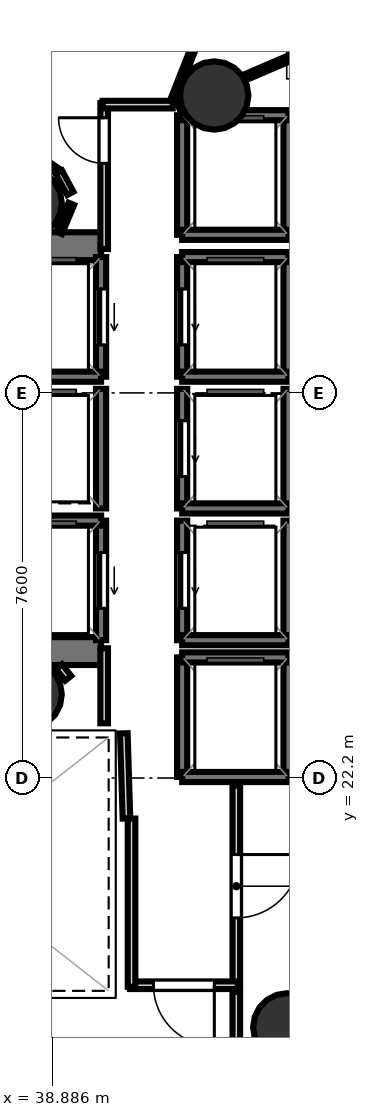
"""IFC4 building model, lengths in metres.
Left out: names, types, materials, properties, quantities, classifications, styles, units other than length and angle.
Written with IfcOpenShell. Run it as: python <this file> out.ifc"""

import sys

from ifc_helpers import new_model, si_unit, direction, frame, frame_2d, origin, origin_2d, place, context, subcontext, project, spatial, rectangle, hollow_circle, extrude, element, fill, save


model = new_model("IFC4")
c1 = context("Model", 3, precision=1e-05, world=origin(), true_north=direction((0.0, 1.0)))
c2 = subcontext(c1, "Body", "Model", "MODEL_VIEW")
j1 = project(units=[si_unit("LENGTHUNIT", "METRE"), si_unit("PLANEANGLEUNIT", "RADIAN")], contexts=[c1])
p1 = place(None, origin())
s1 = spatial("IfcSite", under=j1, at=p1, CompositionType="ELEMENT")
p2 = place(p1, origin())
s2 = spatial("IfcBuilding", under=s1, at=p2, CompositionType="ELEMENT")
p3 = place(p2, frame((0.0, 0.0, 169.8)))
s3 = spatial("IfcBuildingStorey", under=s2, at=p3, CompositionType="ELEMENT", Elevation=169.8)
p4 = place(p3, frame((29.23, 32.695, 0.0), z_axis=(0.0, 0.0, 1.0), x_axis=(1.0, 0.0, 0.0)))
e1 = element("IfcWall", 1, at=p4, inside=s3, PredefinedType="SHEAR", context=c2, shape_type="SweptSolid", body=[
    extrude(rectangle(XDim=10.62, YDim=0.55, at=frame_2d((5.31, 0.0))), origin(), (0.0, 0.0, 1.0), 3.52),
])
p5 = place(p4, frame((0.995, 0.0, 0.0)))
e2 = element("IfcOpeningElement", 2, at=p5, cuts=e1, PredefinedType="OPENING", context=c2, shape_type="SweptSolid", body=[
    extrude(rectangle(XDim=1.25, YDim=2.15, at=frame_2d((0.625, 1.075))), frame((0.0, 0.285, 0.0), z_axis=(0.0, -1.0, 0.0), x_axis=(1.0, 0.0, 0.0)), (0.0, 0.0, 1.0), 0.57),
])
p6 = place(p3, frame((29.23, 24.705, 0.0), z_axis=(0.0, 0.0, 1.0), x_axis=(1.0, 0.0, 0.0)))
e3 = element("IfcWall", 3, at=p6, inside=s3, PredefinedType="SHEAR", context=c2, shape_type="SweptSolid", body=[
    extrude(rectangle(XDim=10.62, YDim=0.55, at=frame_2d((5.31, 0.0))), origin(), (0.0, 0.0, 1.0), 3.52),
])
p7 = place(p6, frame((0.795, 0.0, 0.0)))
e4 = element("IfcOpeningElement", 4, at=p7, cuts=e3, PredefinedType="OPENING", context=c2, shape_type="SweptSolid", body=[
    extrude(rectangle(XDim=1.25, YDim=2.15, at=frame_2d((0.625, 1.075))), frame((0.0, 0.285, 0.0), z_axis=(0.0, -1.0, 0.0), x_axis=(1.0, 0.0, 0.0)), (0.0, 0.0, 1.0), 0.57),
])
for number, where, z_axis, x_axis in (
    (5, (38.4, 33.55, 0.0), (0.0, 0.0, 1.0), (1.0, 0.0, 0.0)),
    (6, (38.4, 23.85, 0.0), (0.0, 0.0, 1.0), (1.0, 0.0, 0.0)),
    (7, (42.083, 35.669, 0.0), (0.0, 0.0, 1.0), (1.0, 0.0, 0.0)),
    (8, (43.525, 17.279, 0.0), (0.0, 0.0, 1.0), (1.0, 0.0, 0.0)),
):
    element("IfcColumn", number, at=place(p3, frame(where, z_axis=z_axis, x_axis=x_axis)), inside=s3, PredefinedType="COLUMN", context=c2, shape_type="SweptSolid", body=[
        extrude(hollow_circle(Radius=0.675, WallThickness=0.032, at=origin_2d()), origin(), (0.0, 0.0, 1.0), 3.7),
    ])
p8 = place(p3, frame((39.85, 30.12, 0.0), z_axis=(0.0, 0.0, 1.0), x_axis=(0.0, 1.0, 0.0)))
e9 = element("IfcWall", 9, at=p8, inside=s3, PredefinedType="SOLIDWALL", context=c2, shape_type="SweptSolid", body=[
    extrude(rectangle(XDim=2.36, YDim=0.2, at=frame_2d((1.18, 0.0))), origin(), (0.0, 0.0, 1.0), 3.52),
])
p9 = place(p8, frame((0.63, 0.0, 0.0)))
e10 = element("IfcOpeningElement", 10, at=p9, cuts=e9, PredefinedType="OPENING", context=c2, shape_type="SweptSolid", body=[
    extrude(rectangle(XDim=1.1, YDim=2.15, at=frame_2d((0.55, 1.075))), frame((0.0, 0.11, 0.0), z_axis=(0.0, -1.0, 0.0), x_axis=(1.0, 0.0, 0.0)), (0.0, 0.0, 1.0), 0.22),
])
p10 = place(p3, frame((37.75, 30.12, 0.0), z_axis=(0.0, 0.0, 1.0), x_axis=(1.0, 0.0, 0.0)))
e11 = element("IfcWall", 11, at=p10, inside=s3, PredefinedType="SOLIDWALL", context=c2, shape_type="SweptSolid", body=[
    extrude(rectangle(XDim=2.1, YDim=0.2, at=frame_2d((1.05, 0.0))), origin(), (0.0, 0.0, 1.0), 3.52),
])
p11 = place(p3, frame((39.85, 24.92, 0.0), z_axis=(0.0, 0.0, 1.0), x_axis=(0.0, 1.0, 0.0)))
e12 = element("IfcWall", 12, at=p11, inside=s3, PredefinedType="SOLIDWALL", context=c2, shape_type="SweptSolid", body=[
    extrude(rectangle(XDim=2.36, YDim=0.2, at=frame_2d((1.18, 0.0))), origin(), (0.0, 0.0, 1.0), 3.52),
])
p12 = place(p11, frame((0.63, 0.0, 0.0)))
e13 = element("IfcOpeningElement", 13, at=p12, cuts=e12, PredefinedType="OPENING", context=c2, shape_type="SweptSolid", body=[
    extrude(rectangle(XDim=1.1, YDim=2.15, at=frame_2d((0.55, 1.075))), frame((0.0, 0.11, 0.0), z_axis=(0.0, -1.0, 0.0), x_axis=(1.0, 0.0, 0.0)), (0.0, 0.0, 1.0), 0.22),
])
p13 = place(p3, frame((37.75, 27.28, 0.0), z_axis=(0.0, 0.0, 1.0), x_axis=(1.0, 0.0, 0.0)))
e14 = element("IfcWall", 14, at=p13, inside=s3, PredefinedType="SOLIDWALL", context=c2, shape_type="SweptSolid", body=[
    extrude(rectangle(XDim=2.1, YDim=0.2, at=frame_2d((1.05, 0.0))), origin(), (0.0, 0.0, 1.0), 3.52),
])
p14 = place(p3, frame((43.55, 30.12, 0.0), z_axis=(0.0, 0.0, 1.0), x_axis=(0.0, 1.0, 0.0)))
e15 = element("IfcWall", 15, at=p14, inside=s3, PredefinedType="SOLIDWALL", context=c2, shape_type="SweptSolid", body=[
    extrude(rectangle(XDim=2.36, YDim=0.2, at=frame_2d((1.18, 0.0))), origin(), (0.0, 0.0, 1.0), 3.52),
])
p15 = place(p3, frame((41.45, 30.12, 0.0), z_axis=(0.0, 0.0, 1.0), x_axis=(0.0, 1.0, 0.0)))
e16 = element("IfcWall", 16, at=p15, inside=s3, PredefinedType="SOLIDWALL", context=c2, shape_type="SweptSolid", body=[
    extrude(rectangle(XDim=2.36, YDim=0.2, at=frame_2d((1.18, 0.0))), origin(), (0.0, 0.0, 1.0), 3.52),
])
p16 = place(p15, frame((0.63, 0.0, 0.0)))
e17 = element("IfcOpeningElement", 17, at=p16, cuts=e16, PredefinedType="OPENING", context=c2, shape_type="SweptSolid", body=[
    extrude(rectangle(XDim=1.1, YDim=2.15, at=frame_2d((0.55, 1.075))), frame((0.0, 0.11, 0.0), z_axis=(0.0, -1.0, 0.0), x_axis=(1.0, 0.0, 0.0)), (0.0, 0.0, 1.0), 0.22),
])
for number, where, z_axis, x_axis in (
    (18, (41.45, 32.48, 0.0), (0.0, 0.0, 1.0), (1.0, 0.0, 0.0)),
    (19, (41.45, 30.12, 0.0), (0.0, 0.0, 1.0), (1.0, 0.0, 0.0)),
):
    element("IfcWall", number, at=place(p3, frame(where, z_axis=z_axis, x_axis=x_axis)), inside=s3, PredefinedType="SOLIDWALL", context=c2, shape_type="SweptSolid", body=[
        extrude(rectangle(XDim=2.1, YDim=0.2, at=frame_2d((1.05, 0.0))), origin(), (0.0, 0.0, 1.0), 3.52),
    ])
p17 = place(p3, frame((43.55, 27.52, 0.0), z_axis=(0.0, 0.0, 1.0), x_axis=(0.0, 1.0, 0.0)))
e20 = element("IfcWall", 20, at=p17, inside=s3, PredefinedType="SOLIDWALL", context=c2, shape_type="SweptSolid", body=[
    extrude(rectangle(XDim=2.36, YDim=0.2, at=frame_2d((1.18, 0.0))), origin(), (0.0, 0.0, 1.0), 3.52),
])
p18 = place(p3, frame((41.45, 27.52, 0.0), z_axis=(0.0, 0.0, 1.0), x_axis=(0.0, 1.0, 0.0)))
e21 = element("IfcWall", 21, at=p18, inside=s3, PredefinedType="SOLIDWALL", context=c2, shape_type="SweptSolid", body=[
    extrude(rectangle(XDim=2.36, YDim=0.2, at=frame_2d((1.18, 0.0))), origin(), (0.0, 0.0, 1.0), 3.52),
])
p19 = place(p18, frame((0.63, 0.0, 0.0)))
e22 = element("IfcOpeningElement", 22, at=p19, cuts=e21, PredefinedType="OPENING", context=c2, shape_type="SweptSolid", body=[
    extrude(rectangle(XDim=1.1, YDim=2.15, at=frame_2d((0.55, 1.075))), frame((0.0, 0.11, 0.0), z_axis=(0.0, -1.0, 0.0), x_axis=(1.0, 0.0, 0.0)), (0.0, 0.0, 1.0), 0.22),
])
p20 = place(p3, frame((41.45, 27.52, 0.0), z_axis=(0.0, 0.0, 1.0), x_axis=(1.0, 0.0, 0.0)))
e23 = element("IfcWall", 23, at=p20, inside=s3, PredefinedType="SOLIDWALL", context=c2, shape_type="SweptSolid", body=[
    extrude(rectangle(XDim=2.1, YDim=0.2, at=frame_2d((1.05, 0.0))), origin(), (0.0, 0.0, 1.0), 3.52),
])
p21 = place(p3, frame((43.55, 24.92, 0.0), z_axis=(0.0, 0.0, 1.0), x_axis=(0.0, 1.0, 0.0)))
e24 = element("IfcWall", 24, at=p21, inside=s3, PredefinedType="SOLIDWALL", context=c2, shape_type="SweptSolid", body=[
    extrude(rectangle(XDim=2.36, YDim=0.2, at=frame_2d((1.18, 0.0))), origin(), (0.0, 0.0, 1.0), 3.52),
])
p22 = place(p3, frame((41.45, 24.92, 0.0), z_axis=(0.0, 0.0, 1.0), x_axis=(0.0, 1.0, 0.0)))
e25 = element("IfcWall", 25, at=p22, inside=s3, PredefinedType="SOLIDWALL", context=c2, shape_type="SweptSolid", body=[
    extrude(rectangle(XDim=2.36, YDim=0.2, at=frame_2d((1.18, 0.0))), origin(), (0.0, 0.0, 1.0), 3.52),
])
p23 = place(p22, frame((0.63, 0.0, 0.0)))
e26 = element("IfcOpeningElement", 26, at=p23, cuts=e25, PredefinedType="OPENING", context=c2, shape_type="SweptSolid", body=[
    extrude(rectangle(XDim=1.1, YDim=2.15, at=frame_2d((0.55, 1.075))), frame((0.0, 0.11, 0.0), z_axis=(0.0, -1.0, 0.0), x_axis=(1.0, 0.0, 0.0)), (0.0, 0.0, 1.0), 0.22),
])
p24 = place(p3, frame((41.45, 24.92, 0.0), z_axis=(0.0, 0.0, 1.0), x_axis=(1.0, 0.0, 0.0)))
e27 = element("IfcWall", 27, at=p24, inside=s3, PredefinedType="SOLIDWALL", context=c2, shape_type="SweptSolid", body=[
    extrude(rectangle(XDim=2.1, YDim=0.2, at=frame_2d((1.05, 0.0))), origin(), (0.0, 0.0, 1.0), 3.52),
])
p25 = place(p3, frame((39.85, 27.52, 0.0), z_axis=(0.0, 0.0, 1.0), x_axis=(0.0, 1.0, 0.0)))
e28 = element("IfcWall", 28, at=p25, inside=s3, PredefinedType="SOLIDWALL", context=c2, shape_type="SweptSolid", body=[
    extrude(rectangle(XDim=2.36, YDim=0.2, at=frame_2d((1.18, 0.0))), origin(), (0.0, 0.0, 1.0), 3.52),
])
for number, where, z_axis, x_axis in (
    (29, (43.55, 22.22, 0.0), (0.0, 0.0, 1.0), (0.0, 1.0, 0.0)),
    (30, (41.45, 22.22, 0.0), (0.0, 0.0, 1.0), (0.0, 1.0, 0.0)),
):
    element("IfcWall", number, at=place(p3, frame(where, z_axis=z_axis, x_axis=x_axis)), inside=s3, PredefinedType="SOLIDWALL", context=c2, shape_type="SweptSolid", body=[
        extrude(rectangle(XDim=2.36, YDim=0.2, at=frame_2d((1.18, 0.0))), origin(), (0.0, 0.0, 1.0), 3.52),
    ])
for number, where, z_axis, x_axis in (
    (31, (41.45, 24.58, 0.0), (0.0, 0.0, 1.0), (1.0, 0.0, 0.0)),
    (32, (41.45, 22.22, 0.0), (0.0, 0.0, 1.0), (1.0, 0.0, 0.0)),
):
    element("IfcWall", number, at=place(p3, frame(where, z_axis=z_axis, x_axis=x_axis)), inside=s3, PredefinedType="SOLIDWALL", context=c2, shape_type="SweptSolid", body=[
        extrude(rectangle(XDim=2.1, YDim=0.2, at=frame_2d((1.05, 0.0))), origin(), (0.0, 0.0, 1.0), 3.52),
    ])
for number, where, z_axis, x_axis in (
    (33, (43.55, 32.92, 0.0), (0.0, 0.0, 1.0), (0.0, 1.0, 0.0)),
    (34, (41.45, 32.92, 0.0), (0.0, 0.0, 1.0), (0.0, 1.0, 0.0)),
):
    element("IfcWall", number, at=place(p3, frame(where, z_axis=z_axis, x_axis=x_axis)), inside=s3, PredefinedType="SOLIDWALL", context=c2, shape_type="SweptSolid", body=[
        extrude(rectangle(XDim=2.36, YDim=0.2, at=frame_2d((1.18, 0.0))), origin(), (0.0, 0.0, 1.0), 3.52),
    ])
for number, where, z_axis, x_axis in (
    (35, (41.45, 35.28, 0.0), (0.0, 0.0, 1.0), (1.0, 0.0, 0.0)),
    (36, (41.45, 32.92, 0.0), (0.0, 0.0, 1.0), (1.0, 0.0, 0.0)),
):
    element("IfcWall", number, at=place(p3, frame(where, z_axis=z_axis, x_axis=x_axis)), inside=s3, PredefinedType="SOLIDWALL", context=c2, shape_type="SweptSolid", body=[
        extrude(rectangle(XDim=2.1, YDim=0.2, at=frame_2d((1.05, 0.0))), origin(), (0.0, 0.0, 1.0), 3.52),
    ])
p26 = place(p3, frame((40.351, 21.401, 0.0), z_axis=(0.0, 0.0, 1.0), x_axis=(-0.031058045979, 0.999517582527, 0.0)))
e37 = element("IfcWall", 37, at=p26, inside=s3, PredefinedType="PARTITIONING", context=c2, shape_type="SweptSolid", body=[
    extrude(rectangle(XDim=1.682, YDim=0.15, at=frame_2d((0.841, 0.0))), origin(), (0.0, 0.0, 1.0), 2.84),
])
p27 = place(p3, frame((39.911, 23.28, 0.0), z_axis=(0.0, 0.0, 1.0), x_axis=(0.0, 1.0, 0.0)))
e38 = element("IfcWall", 38, at=p27, inside=s3, PredefinedType="PARTITIONING", context=c2, shape_type="SweptSolid", body=[
    extrude(rectangle(XDim=1.48, YDim=0.15, at=frame_2d((0.74, 0.0))), origin(), (0.0, 0.0, 1.0), 2.84),
])
p28 = place(p3, frame((39.911, 32.64, 0.0), z_axis=(0.0, 0.0, 1.0), x_axis=(0.0, 1.0, 0.0)))
e39 = element("IfcWall", 39, at=p28, inside=s3, PredefinedType="PARTITIONING", context=c2, shape_type="SweptSolid", body=[
    extrude(rectangle(XDim=2.88, YDim=0.15, at=frame_2d((1.44, 0.0))), origin(), (0.0, 0.0, 1.0), 2.84),
])
p29 = place(p28, frame((1.69, 0.0, 0.0)))
e40 = element("IfcOpeningElement", 40, at=p29, cuts=e39, PredefinedType="OPENING", context=c2, shape_type="SweptSolid", body=[
    extrude(rectangle(XDim=0.9, YDim=2.1, at=frame_2d((0.45, 1.05))), frame((0.0, 0.085, 0.0), z_axis=(0.0, -1.0, 0.0), x_axis=(1.0, 0.0, 0.0)), (0.0, 0.0, 1.0), 0.17),
])
p30 = place(p3, frame((39.88, 35.489, 0.0), z_axis=(0.0, 0.0, 1.0), x_axis=(1.0, 0.0, 0.0)))
e41 = element("IfcWall", 41, at=p30, inside=s3, PredefinedType="PARTITIONING", context=c2, shape_type="SweptSolid", body=[
    extrude(rectangle(XDim=1.383, YDim=0.15, at=frame_2d((0.691, 0.0))), origin(), (0.0, 0.0, 1.0), 2.84),
])
p31 = place(p3, frame((42.519, 22.05, 0.0), z_axis=(0.0, 0.0, 1.0), x_axis=(0.0, -1.0, 0.0)))
e42 = element("IfcWall", 42, at=p31, inside=s3, PredefinedType="PARTITIONING", context=c2, shape_type="SweptSolid", body=[
    extrude(rectangle(XDim=3.97, YDim=0.15, at=frame_2d((1.985, 0.0))), origin(), (0.0, 0.0, 1.0), 2.84),
])
p32 = place(p31, frame((1.36, 0.0, 0.0)))
e43 = element("IfcOpeningElement", 43, at=p32, cuts=e42, PredefinedType="OPENING", context=c2, shape_type="SweptSolid", body=[
    extrude(rectangle(XDim=1.25, YDim=2.2, at=frame_2d((0.625, 1.1))), frame((0.0, 0.085, 0.0), z_axis=(0.0, -1.0, 0.0), x_axis=(1.0, 0.0, 0.0)), (0.0, 0.0, 1.0), 0.17),
])
p33 = place(p3, frame((42.55, 18.111, 0.0), z_axis=(0.0, 0.0, 1.0), x_axis=(-1.0, 0.0, 0.0)))
e44 = element("IfcWall", 44, at=p33, inside=s3, PredefinedType="PARTITIONING", context=c2, shape_type="SweptSolid", body=[
    extrude(rectangle(XDim=2.13, YDim=0.15, at=frame_2d((1.065, 0.0))), origin(), (0.0, 0.0, 1.0), 2.84),
])
p34 = place(p33, frame((0.465, 0.0, 0.0)))
e45 = element("IfcOpeningElement", 45, at=p34, cuts=e44, PredefinedType="OPENING", context=c2, shape_type="SweptSolid", body=[
    extrude(rectangle(XDim=1.2, YDim=2.15, at=frame_2d((0.6, 1.075))), frame((0.0, 0.085, 0.0), z_axis=(0.0, -1.0, 0.0), x_axis=(1.0, 0.0, 0.0)), (0.0, 0.0, 1.0), 0.17),
])
p35 = place(p3, frame((40.451, 18.08, 0.0), z_axis=(0.0, 0.0, 1.0), x_axis=(0.0, 1.0, 0.0)))
e46 = element("IfcWall", 46, at=p35, inside=s3, PredefinedType="PARTITIONING", context=c2, shape_type="SweptSolid", body=[
    extrude(rectangle(XDim=3.32, YDim=0.15, at=frame_2d((1.66, 0.0))), origin(), (0.0, 0.0, 1.0), 2.84),
])
p36 = place(p3, frame((39.202, 24.169, 0.0), z_axis=(0.0, 0.0, 1.0), x_axis=(-0.622453876994, 0.782656483405, 0.0)))
e47 = element("IfcWall", 47, at=p36, inside=s3, PredefinedType="PARTITIONING", context=c2, shape_type="SweptSolid", body=[
    extrude(rectangle(XDim=0.292, YDim=0.15, at=frame_2d((0.146, 0.0))), origin(), (0.0, 0.0, 1.0), 2.84),
])
p37 = place(p3, frame((42.519, 17.98, 0.0), z_axis=(0.0, 0.0, 1.0), x_axis=(0.0, -1.0, 0.0)))
e48 = element("IfcWall", 48, at=p37, inside=s3, PredefinedType="PARTITIONING", context=c2, shape_type="SweptSolid", body=[
    extrude(rectangle(XDim=3.067, YDim=0.15, at=frame_2d((1.533, 0.0))), origin(), (0.0, 0.0, 1.0), 2.84),
])
p38 = place(p3, frame((43.969, 36.576, 0.0), z_axis=(0.0, 0.0, 1.0), x_axis=(-0.919028863482, -0.394190243521, 0.0)))
e49 = element("IfcWall", 49, at=p38, inside=s3, PredefinedType="PARTITIONING", context=c2, shape_type="SweptSolid", body=[
    extrude(rectangle(XDim=2.827, YDim=0.12, at=frame_2d((1.414, 0.0))), origin(), (0.0, 0.0, 1.0), 2.84),
])
p39 = place(p3, frame((41.273, 35.589, 0.0), z_axis=(0.0, 0.0, 1.0), x_axis=(0.365105724435, 0.930966062746, 0.0)))
e50 = element("IfcWall", 50, at=p39, inside=s3, PredefinedType="PARTITIONING", context=c2, shape_type="SweptSolid", body=[
    extrude(rectangle(XDim=1.824, YDim=0.105, at=frame_2d((0.912, 0.0))), origin(), (0.0, 0.0, 1.0), 2.84),
])
p40 = place(p3, frame((39.243, 33.738, 0.0), z_axis=(0.0, 0.0, 1.0), x_axis=(-0.475420071565, 0.879758918996, 0.0)))
e51 = element("IfcWall", 51, at=p40, inside=s3, PredefinedType="PARTITIONING", context=c2, shape_type="SweptSolid", body=[
    extrude(rectangle(XDim=0.474, YDim=0.14, at=frame_2d((0.237, 0.0))), origin(), (0.0, 0.0, 1.0), 2.84),
])
p41 = place(p3, frame((39.008, 34.166, 0.0), z_axis=(0.0, 0.0, 1.0), x_axis=(-0.83170430964, 0.555218822922, 0.0)))
e52 = element("IfcWall", 52, at=p41, inside=s3, PredefinedType="PARTITIONING", context=c2, shape_type="SweptSolid", body=[
    extrude(rectangle(XDim=0.326, YDim=0.12, at=frame_2d((0.163, 0.0))), origin(), (0.0, 0.0, 1.0), 2.84),
])
p42 = place(p3, frame((39.023, 32.958, 0.0), z_axis=(0.0, 0.0, 1.0), x_axis=(0.385702795868, 0.922623082987, 0.0)))
e53 = element("IfcWall", 53, at=p42, inside=s3, PredefinedType="PARTITIONING", context=c2, shape_type="SweptSolid", body=[
    extrude(rectangle(XDim=0.622, YDim=0.12, at=frame_2d((0.311, 0.0))), origin(), (0.0, 0.0, 1.0), 2.84),
])
p43 = place(p9, origin())
e54 = element("IfcDoor", 54, at=p43, inside=s3, OperationType="SLIDING_TO_LEFT", PredefinedType="DOOR", context=c2, shape_type="SweptSolid", body=[
    extrude(rectangle(XDim=1.1, YDim=2.15, at=frame_2d((0.55, 1.075))), frame((0.0, 0.025, 0.0), z_axis=(0.0, -1.0, 0.0), x_axis=(1.0, 0.0, 0.0)), (0.0, 0.0, 1.0), 0.05),
])
fill(e10, e54)
p44 = place(p12, origin())
e55 = element("IfcDoor", 55, at=p44, inside=s3, OperationType="SLIDING_TO_LEFT", PredefinedType="DOOR", context=c2, shape_type="SweptSolid", body=[
    extrude(rectangle(XDim=1.1, YDim=2.15, at=frame_2d((0.55, 1.075))), frame((0.0, 0.025, 0.0), z_axis=(0.0, -1.0, 0.0), x_axis=(1.0, 0.0, 0.0)), (0.0, 0.0, 1.0), 0.05),
])
fill(e13, e55)
p45 = place(p16, origin())
e56 = element("IfcDoor", 56, at=p45, inside=s3, OperationType="SLIDING_TO_LEFT", PredefinedType="DOOR", context=c2, shape_type="SweptSolid", body=[
    extrude(rectangle(XDim=1.1, YDim=2.15, at=frame_2d((0.55, 1.075))), frame((0.0, 0.025, 0.0), z_axis=(0.0, -1.0, 0.0), x_axis=(1.0, 0.0, 0.0)), (0.0, 0.0, 1.0), 0.05),
])
fill(e17, e56)
p46 = place(p19, origin())
e57 = element("IfcDoor", 57, at=p46, inside=s3, OperationType="SLIDING_TO_LEFT", PredefinedType="DOOR", context=c2, shape_type="SweptSolid", body=[
    extrude(rectangle(XDim=1.1, YDim=2.15, at=frame_2d((0.55, 1.075))), frame((0.0, 0.025, 0.0), z_axis=(0.0, -1.0, 0.0), x_axis=(1.0, 0.0, 0.0)), (0.0, 0.0, 1.0), 0.05),
])
fill(e22, e57)
p47 = place(p23, origin())
e58 = element("IfcDoor", 58, at=p47, inside=s3, OperationType="SLIDING_TO_LEFT", PredefinedType="DOOR", context=c2, shape_type="SweptSolid", body=[
    extrude(rectangle(XDim=1.1, YDim=2.15, at=frame_2d((0.55, 1.075))), frame((0.0, 0.025, 0.0), z_axis=(0.0, -1.0, 0.0), x_axis=(1.0, 0.0, 0.0)), (0.0, 0.0, 1.0), 0.05),
])
fill(e26, e58)
p48 = place(p34, origin())
e59 = element("IfcDoor", 59, at=p48, inside=s3, OperationType="SINGLE_SWING_LEFT", PredefinedType="DOOR", context=c2, shape_type="SweptSolid", body=[
    extrude(rectangle(XDim=1.2, YDim=2.15, at=frame_2d((0.6, 1.075))), frame((0.0, 0.025, 0.0), z_axis=(0.0, -1.0, 0.0), x_axis=(1.0, 0.0, 0.0)), (0.0, 0.0, 1.0), 0.05),
])
fill(e45, e59)
p49 = place(p32, origin())
e60 = element("IfcDoor", 60, at=p49, inside=s3, OperationType="SINGLE_SWING_LEFT", PredefinedType="DOOR", context=c2, shape_type="SweptSolid", body=[
    extrude(rectangle(XDim=1.25, YDim=2.2, at=frame_2d((0.625, 1.1))), frame((0.0, 0.025, 0.0), z_axis=(0.0, -1.0, 0.0), x_axis=(1.0, 0.0, 0.0)), (0.0, 0.0, 1.0), 0.05),
])
fill(e43, e60)
p50 = place(p29, origin())
e61 = element("IfcDoor", 61, at=p50, inside=s3, OperationType="SINGLE_SWING_RIGHT", PredefinedType="DOOR", context=c2, shape_type="SweptSolid", body=[
    extrude(rectangle(XDim=0.9, YDim=2.1, at=frame_2d((0.45, 1.05))), frame((0.0, 0.025, 0.0), z_axis=(0.0, -1.0, 0.0), x_axis=(1.0, 0.0, 0.0)), (0.0, 0.0, 1.0), 0.05),
])
fill(e40, e61)
save(model, sys.argv[1])
